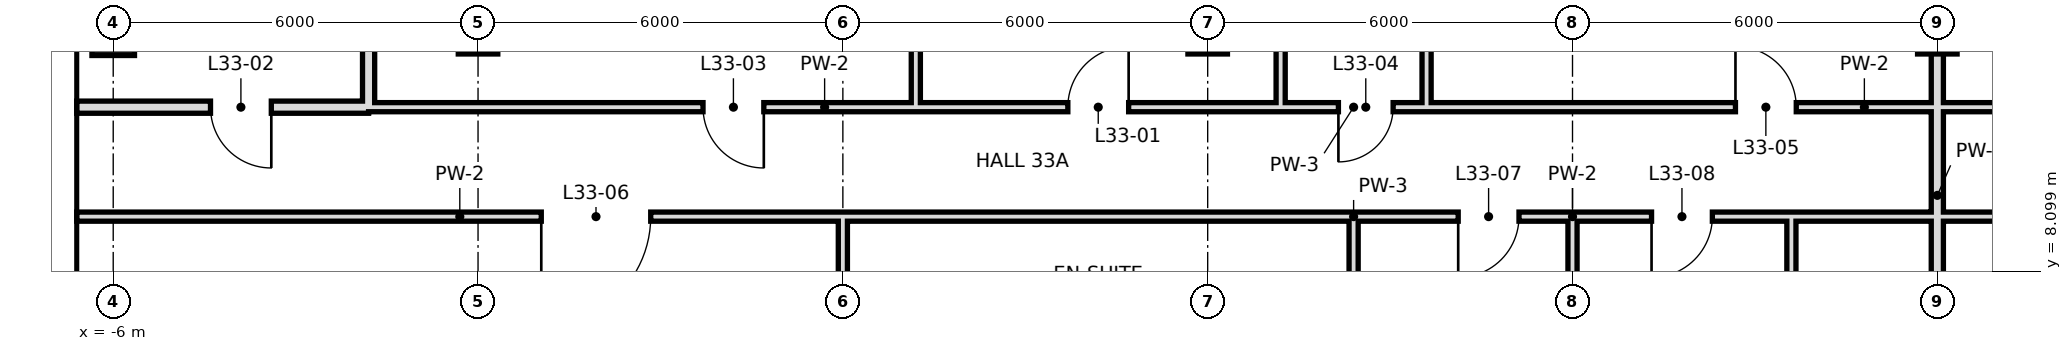
"""IFC4 building model, lengths in metres.
Left out: names, types, materials, properties, quantities, classifications, styles, units other than length and angle.
Written with IfcOpenShell. Run it as: python <this file> out.ifc"""

import sys

from ifc_helpers import new_model, si_unit, direction, frame, frame_2d, origin, origin_2d, place, context, subcontext, project, spatial, rectangle, hollow_rectangle, extrude, element, fill, save


model = new_model("IFC4")
c1 = context("Model", 3, precision=1e-05, world=origin(), true_north=direction((0.0, 1.0)))
c2 = subcontext(c1, "Body", "Model", "MODEL_VIEW")
j1 = project(units=[si_unit("LENGTHUNIT", "METRE"), si_unit("PLANEANGLEUNIT", "RADIAN")], contexts=[c1])
p1 = place(None, origin())
s1 = spatial("IfcSite", under=j1, at=p1, CompositionType="ELEMENT")
p2 = place(p1, origin())
s2 = spatial("IfcBuilding", under=s1, at=p2, CompositionType="ELEMENT")
p3 = place(p2, frame((0.0, 0.0, 147.4)))
s3 = spatial("IfcBuildingStorey", under=s2, at=p3, CompositionType="ELEMENT", Elevation=147.4)
p4 = place(p3, frame((-6.0, 12.0, 0.0), z_axis=(0.0, 0.0, 1.0), x_axis=(1.0, 0.0, 0.0)))
e1 = element("IfcColumn", 1, at=p4, inside=s3, PredefinedType="COLUMN", context=c2, shape_type="SweptSolid", body=[
    extrude(hollow_rectangle(XDim=0.7, YDim=0.7, WallThickness=0.036, at=origin_2d()), origin(), (0.0, 0.0, 1.0), 3.6),
])
for number, where, z_axis, x_axis in (
    (2, (0.0, 12.0, 0.0), (0.0, 0.0, 1.0), (1.0, 0.0, 0.0)),
    (3, (12.0, 12.0, 0.0), (0.0, 0.0, 1.0), (1.0, 0.0, 0.0)),
    (4, (24.0, 12.0, 0.0), (0.0, 0.0, 1.0), (1.0, 0.0, 0.0)),
):
    element("IfcColumn", number, at=place(p3, frame(where, z_axis=z_axis, x_axis=x_axis)), inside=s3, PredefinedType="COLUMN", context=c2, shape_type="SweptSolid", body=[
        extrude(hollow_rectangle(XDim=0.65, YDim=0.65, WallThickness=0.032, at=origin_2d()), origin(), (0.0, 0.0, 1.0), 3.6),
    ])
p5 = place(p3, frame((-1.8, 10.8, 0.0), z_axis=(0.0, 0.0, 1.0), x_axis=(0.0, 1.0, 0.0)))
e5 = element("IfcWall", 5, at=p5, inside=s3, PredefinedType="SOLIDWALL", context=c2, shape_type="SweptSolid", body=[
    extrude(rectangle(XDim=7.2, YDim=0.2, at=frame_2d((3.6, 0.0))), origin(), (0.0, 0.0, 1.0), 3.42),
])
p6 = place(p3, frame((13.2, 10.8, 0.0), z_axis=(0.0, 0.0, 1.0), x_axis=(0.0, 1.0, 0.0)))
e6 = element("IfcWall", 6, at=p6, inside=s3, PredefinedType="PARTITIONING", context=c2, shape_type="SweptSolid", body=[
    extrude(rectangle(XDim=7.9, YDim=0.15, at=frame_2d((3.95, 0.0))), origin(), (0.0, 0.0, 1.0), 3.42),
])
p7 = place(p3, frame((14.4, 6.0, 0.0), z_axis=(0.0, 0.0, 1.0), x_axis=(0.0, 1.0, 0.0)))
e7 = element("IfcWall", 7, at=p7, inside=s3, PredefinedType="PARTITIONING", context=c2, shape_type="SweptSolid", body=[
    extrude(rectangle(XDim=3.0, YDim=0.15, at=frame_2d((1.5, 0.0))), origin(), (0.0, 0.0, 1.0), 3.42),
])
p8 = place(p3, frame((15.6, 10.8, 0.0), z_axis=(0.0, 0.0, 1.0), x_axis=(0.0, 1.0, 0.0)))
e8 = element("IfcWall", 8, at=p8, inside=s3, PredefinedType="PARTITIONING", context=c2, shape_type="SweptSolid", body=[
    extrude(rectangle(XDim=7.9, YDim=0.15, at=frame_2d((3.95, 0.0))), origin(), (0.0, 0.0, 1.0), 3.42),
])
p9 = place(p3, frame((18.0, -0.6, 0.0), z_axis=(0.0, 0.0, 1.0), x_axis=(0.0, 1.0, 0.0)))
e9 = element("IfcWall", 9, at=p9, inside=s3, PredefinedType="PARTITIONING", context=c2, shape_type="SweptSolid", body=[
    extrude(rectangle(XDim=9.6, YDim=0.15, at=frame_2d((4.8, 0.0))), origin(), (0.0, 0.0, 1.0), 2.72),
])
p10 = place(p3, frame((21.6, 6.0, 0.0), z_axis=(0.0, 0.0, 1.0), x_axis=(0.0, 1.0, 0.0)))
e10 = element("IfcWall", 10, at=p10, inside=s3, PredefinedType="PARTITIONING", context=c2, shape_type="SweptSolid", body=[
    extrude(rectangle(XDim=3.0, YDim=0.15, at=frame_2d((1.5, 0.0))), origin(), (0.0, 0.0, 1.0), 3.42),
])
p11 = place(p3, frame((24.0, 0.0, 0.0), z_axis=(0.0, 0.0, 1.0), x_axis=(0.0, 1.0, 0.0)))
e11 = element("IfcWall", 11, at=p11, inside=s3, PredefinedType="SOLIDWALL", context=c2, shape_type="SweptSolid", body=[
    extrude(rectangle(XDim=18.7, YDim=0.2, at=frame_2d((9.35, 0.0))), origin(), (0.0, 0.0, 1.0), 2.72),
])
p12 = place(p3, frame((6.0, 6.0, 0.0), z_axis=(0.0, 0.0, 1.0), x_axis=(0.0, 1.0, 0.0)))
e12 = element("IfcWall", 12, at=p12, inside=s3, PredefinedType="PARTITIONING", context=c2, shape_type="SweptSolid", body=[
    extrude(rectangle(XDim=3.0, YDim=0.15, at=frame_2d((1.5, 0.0))), origin(), (0.0, 0.0, 1.0), 2.72),
])
p13 = place(p3, frame((7.2, 10.8, 0.0), z_axis=(0.0, 0.0, 1.0), x_axis=(0.0, 1.0, 0.0)))
e13 = element("IfcWall", 13, at=p13, inside=s3, PredefinedType="PARTITIONING", context=c2, shape_type="SweptSolid", body=[
    extrude(rectangle(XDim=7.9, YDim=0.15, at=frame_2d((3.95, 0.0))), origin(), (0.0, 0.0, 1.0), 3.42),
])
p14 = place(p3, frame((-6.6, 10.8, 0.0), z_axis=(0.0, 0.0, 1.0), x_axis=(1.0, 0.0, 0.0)))
e14 = element("IfcWall", 14, at=p14, inside=s3, PredefinedType="SOLIDWALL", context=c2, shape_type="SweptSolid", body=[
    extrude(rectangle(XDim=4.8, YDim=0.2, at=frame_2d((2.4, 0.0))), origin(), (0.0, 0.0, 1.0), 2.97),
])
p15 = place(p14, frame((2.2, 0.0, 0.0)))
e15 = element("IfcOpeningElement", 15, at=p15, cuts=e14, PredefinedType="OPENING", context=c2, shape_type="SweptSolid", body=[
    extrude(rectangle(XDim=1.0, YDim=2.4, at=frame_2d((0.5, 1.2))), frame((0.0, 0.11, 0.0), z_axis=(0.0, -1.0, 0.0), x_axis=(1.0, 0.0, 0.0)), (0.0, 0.0, 1.0), 0.22),
])
p16 = place(p3, frame((-1.8, 10.8, 0.0), z_axis=(0.0, 0.0, 1.0), x_axis=(1.0, 0.0, 0.0)))
e16 = element("IfcWall", 16, at=p16, inside=s3, PredefinedType="PARTITIONING", context=c2, shape_type="SweptSolid", body=[
    extrude(rectangle(XDim=15.0, YDim=0.15, at=frame_2d((7.5, 0.0))), origin(), (0.0, 0.0, 1.0), 3.42),
])
p17 = place(p16, frame((11.5, 0.0, 0.0)))
e17 = element("IfcOpeningElement", 17, at=p17, cuts=e16, PredefinedType="OPENING", context=c2, shape_type="SweptSolid", body=[
    extrude(rectangle(XDim=1.0, YDim=2.4, at=frame_2d((0.5, 1.2))), frame((0.0, 0.085, 0.0), z_axis=(0.0, -1.0, 0.0), x_axis=(1.0, 0.0, 0.0)), (0.0, 0.0, 1.0), 0.17),
])
p18 = place(p16, frame((5.5, 0.0, 0.0)))
e18 = element("IfcOpeningElement", 18, at=p18, cuts=e16, PredefinedType="OPENING", context=c2, shape_type="SweptSolid", body=[
    extrude(rectangle(XDim=1.0, YDim=2.4, at=frame_2d((0.5, 1.2))), frame((0.0, 0.085, 0.0), z_axis=(0.0, -1.0, 0.0), x_axis=(1.0, 0.0, 0.0)), (0.0, 0.0, 1.0), 0.17),
])
p19 = place(p3, frame((15.6, 10.8, 0.0), z_axis=(0.0, 0.0, 1.0), x_axis=(1.0, 0.0, 0.0)))
e19 = element("IfcWall", 19, at=p19, inside=s3, PredefinedType="PARTITIONING", context=c2, shape_type="SweptSolid", body=[
    extrude(rectangle(XDim=14.4, YDim=0.15, at=frame_2d((7.2, 0.0))), origin(), (0.0, 0.0, 1.0), 3.42),
])
p20 = place(p19, frame((5.08, 0.0, 0.0)))
e20 = element("IfcOpeningElement", 20, at=p20, cuts=e19, PredefinedType="OPENING", context=c2, shape_type="SweptSolid", body=[
    extrude(rectangle(XDim=1.0, YDim=2.4, at=frame_2d((0.5, 1.2))), frame((0.0, 0.085, 0.0), z_axis=(0.0, -1.0, 0.0), x_axis=(1.0, 0.0, 0.0)), (0.0, 0.0, 1.0), 0.17),
])
p21 = place(p19, frame((10.9, 0.0, 0.0)))
e21 = element("IfcOpeningElement", 21, at=p21, cuts=e19, PredefinedType="OPENING", context=c2, shape_type="SweptSolid", body=[
    extrude(rectangle(XDim=1.0, YDim=2.4, at=frame_2d((0.5, 1.2))), frame((0.0, 0.085, 0.0), z_axis=(0.0, -1.0, 0.0), x_axis=(1.0, 0.0, 0.0)), (0.0, 0.0, 1.0), 0.17),
])
p22 = place(p3, frame((13.2, 10.8, 0.0), z_axis=(0.0, 0.0, 1.0), x_axis=(1.0, 0.0, 0.0)))
e22 = element("IfcWall", 22, at=p22, inside=s3, PredefinedType="PARTITIONING", context=c2, shape_type="SweptSolid", body=[
    extrude(rectangle(XDim=2.4, YDim=0.15, at=frame_2d((1.2, 0.0))), origin(), (0.0, 0.0, 1.0), 3.42),
])
p23 = place(p22, frame((0.95, 0.0, 0.0)))
e23 = element("IfcOpeningElement", 23, at=p23, cuts=e22, PredefinedType="OPENING", context=c2, shape_type="SweptSolid", body=[
    extrude(rectangle(XDim=0.9, YDim=2.4, at=frame_2d((0.45, 1.2))), frame((0.0, 0.085, 0.0), z_axis=(0.0, -1.0, 0.0), x_axis=(1.0, 0.0, 0.0)), (0.0, 0.0, 1.0), 0.17),
])
p24 = place(p3, frame((-6.6, 9.0, 0.0), z_axis=(0.0, 0.0, 1.0), x_axis=(1.0, 0.0, 0.0)))
e24 = element("IfcWall", 24, at=p24, inside=s3, PredefinedType="PARTITIONING", context=c2, shape_type="SweptSolid", body=[
    extrude(rectangle(XDim=12.6, YDim=0.15, at=frame_2d((6.3, 0.0))), origin(), (0.0, 0.0, 1.0), 3.42),
])
p25 = place(p24, frame((7.64, 0.0, 0.0)))
e25 = element("IfcOpeningElement", 25, at=p25, cuts=e24, PredefinedType="OPENING", context=c2, shape_type="SweptSolid", body=[
    extrude(rectangle(XDim=1.8, YDim=2.4, at=frame_2d((0.9, 1.2))), frame((0.0, 0.085, 0.0), z_axis=(0.0, -1.0, 0.0), x_axis=(1.0, 0.0, 0.0)), (0.0, 0.0, 1.0), 0.17),
])
p26 = place(p3, frame((14.4, 9.0, 0.0), z_axis=(0.0, 0.0, 1.0), x_axis=(1.0, 0.0, 0.0)))
e26 = element("IfcWall", 26, at=p26, inside=s3, PredefinedType="PARTITIONING", context=c2, shape_type="SweptSolid", body=[
    extrude(rectangle(XDim=7.2, YDim=0.15, at=frame_2d((3.6, 0.0))), origin(), (0.0, 0.0, 1.0), 3.42),
])
p27 = place(p26, frame((1.72, 0.0, 0.0)))
e27 = element("IfcOpeningElement", 27, at=p27, cuts=e26, PredefinedType="OPENING", context=c2, shape_type="SweptSolid", body=[
    extrude(rectangle(XDim=1.0, YDim=2.4, at=frame_2d((0.5, 1.2))), frame((0.0, 0.085, 0.0), z_axis=(0.0, -1.0, 0.0), x_axis=(1.0, 0.0, 0.0)), (0.0, 0.0, 1.0), 0.17),
])
p28 = place(p26, frame((4.9, 0.0, 0.0)))
e28 = element("IfcOpeningElement", 28, at=p28, cuts=e26, PredefinedType="OPENING", context=c2, shape_type="SweptSolid", body=[
    extrude(rectangle(XDim=1.0, YDim=2.4, at=frame_2d((0.5, 1.2))), frame((0.0, 0.085, 0.0), z_axis=(0.0, -1.0, 0.0), x_axis=(1.0, 0.0, 0.0)), (0.0, 0.0, 1.0), 0.17),
])
p29 = place(p3, frame((24.0, 9.0, 0.0), z_axis=(0.0, 0.0, 1.0), x_axis=(1.0, 0.0, 0.0)))
e29 = element("IfcWall", 29, at=p29, inside=s3, PredefinedType="PARTITIONING", context=c2, shape_type="SweptSolid", body=[
    extrude(rectangle(XDim=27.6, YDim=0.15, at=frame_2d((13.8, 0.0))), origin(), (0.0, 0.0, 1.0), 3.42),
])
p30 = place(p29, frame((3.16, 0.0, 0.0)))
e30 = element("IfcOpeningElement", 30, at=p30, cuts=e29, PredefinedType="OPENING", context=c2, shape_type="SweptSolid", body=[
    extrude(rectangle(XDim=1.8, YDim=2.4, at=frame_2d((0.9, 1.2))), frame((0.0, 0.085, 0.0), z_axis=(0.0, -1.0, 0.0), x_axis=(1.0, 0.0, 0.0)), (0.0, 0.0, 1.0), 0.17),
])
p31 = place(p29, frame((13.6, 0.0, 0.0)))
e31 = element("IfcOpeningElement", 31, at=p31, cuts=e29, PredefinedType="OPENING", context=c2, shape_type="SweptSolid", body=[
    extrude(rectangle(XDim=1.0, YDim=2.4, at=frame_2d((0.5, 1.2))), frame((0.0, 0.085, 0.0), z_axis=(0.0, -1.0, 0.0), x_axis=(1.0, 0.0, 0.0)), (0.0, 0.0, 1.0), 0.17),
])
p32 = place(p29, frame((21.4, 0.0, 0.0)))
e32 = element("IfcOpeningElement", 32, at=p32, cuts=e29, PredefinedType="OPENING", context=c2, shape_type="SweptSolid", body=[
    extrude(rectangle(XDim=1.0, YDim=2.4, at=frame_2d((0.5, 1.2))), frame((0.0, 0.085, 0.0), z_axis=(0.0, -1.0, 0.0), x_axis=(1.0, 0.0, 0.0)), (0.0, 0.0, 1.0), 0.17),
])
p33 = place(p29, frame((24.88, 0.0, 0.0)))
e33 = element("IfcOpeningElement", 33, at=p33, cuts=e29, PredefinedType="OPENING", context=c2, shape_type="SweptSolid", body=[
    extrude(rectangle(XDim=1.0, YDim=2.4, at=frame_2d((0.5, 1.2))), frame((0.0, 0.085, 0.0), z_axis=(0.0, -1.0, 0.0), x_axis=(1.0, 0.0, 0.0)), (0.0, 0.0, 1.0), 0.17),
])
p34 = place(p3, frame((6.0, 9.0, 0.0), z_axis=(0.0, 0.0, 1.0), x_axis=(1.0, 0.0, 0.0)))
e34 = element("IfcWall", 34, at=p34, inside=s3, PredefinedType="PARTITIONING", context=c2, shape_type="SweptSolid", body=[
    extrude(rectangle(XDim=8.4, YDim=0.15, at=frame_2d((4.2, 0.0))), origin(), (0.0, 0.0, 1.0), 3.42),
])
p35 = place(p3, frame((21.6, 9.0, 0.0), z_axis=(0.0, 0.0, 1.0), x_axis=(1.0, 0.0, 0.0)))
e35 = element("IfcWall", 35, at=p35, inside=s3, PredefinedType="PARTITIONING", context=c2, shape_type="SweptSolid", body=[
    extrude(rectangle(XDim=2.4, YDim=0.15, at=frame_2d((1.2, 0.0))), origin(), (0.0, 0.0, 1.0), 3.42),
])
p36 = place(p17, frame((1.0, 0.0, 0.0), z_axis=(0.0, 0.0, 1.0), x_axis=(-1.0, 0.0, 0.0)))
e36 = element("IfcDoor", 36, at=p36, inside=s3, OperationType="SINGLE_SWING_LEFT", PredefinedType="DOOR", context=c2, shape_type="SweptSolid", body=[
    extrude(rectangle(XDim=1.0, YDim=2.4, at=frame_2d((0.5, 1.2))), frame((0.0, 0.025, 0.0), z_axis=(0.0, -1.0, 0.0), x_axis=(1.0, 0.0, 0.0)), (0.0, 0.0, 1.0), 0.05),
])
fill(e17, e36)
p37 = place(p15, origin())
e37 = element("IfcDoor", 37, at=p37, inside=s3, OperationType="SINGLE_SWING_RIGHT", PredefinedType="DOOR", context=c2, shape_type="SweptSolid", body=[
    extrude(rectangle(XDim=1.0, YDim=2.4, at=frame_2d((0.5, 1.2))), frame((0.0, 0.025, 0.0), z_axis=(0.0, -1.0, 0.0), x_axis=(1.0, 0.0, 0.0)), (0.0, 0.0, 1.0), 0.05),
])
fill(e15, e37)
p38 = place(p18, origin())
e38 = element("IfcDoor", 38, at=p38, inside=s3, OperationType="SINGLE_SWING_RIGHT", PredefinedType="DOOR", context=c2, shape_type="SweptSolid", body=[
    extrude(rectangle(XDim=1.0, YDim=2.4, at=frame_2d((0.5, 1.2))), frame((0.0, 0.025, 0.0), z_axis=(0.0, -1.0, 0.0), x_axis=(1.0, 0.0, 0.0)), (0.0, 0.0, 1.0), 0.05),
])
fill(e18, e38)
p39 = place(p23, frame((0.9, 0.0, 0.0), z_axis=(0.0, 0.0, 1.0), x_axis=(-1.0, 0.0, 0.0)))
e39 = element("IfcDoor", 39, at=p39, inside=s3, OperationType="SINGLE_SWING_RIGHT", PredefinedType="DOOR", context=c2, shape_type="SweptSolid", body=[
    extrude(rectangle(XDim=0.9, YDim=2.4, at=frame_2d((0.45, 1.2))), frame((0.0, 0.025, 0.0), z_axis=(0.0, -1.0, 0.0), x_axis=(1.0, 0.0, 0.0)), (0.0, 0.0, 1.0), 0.05),
])
fill(e23, e39)
p40 = place(p20, origin())
e40 = element("IfcDoor", 40, at=p40, inside=s3, OperationType="SINGLE_SWING_LEFT", PredefinedType="DOOR", context=c2, shape_type="SweptSolid", body=[
    extrude(rectangle(XDim=1.0, YDim=2.4, at=frame_2d((0.5, 1.2))), frame((0.0, 0.025, 0.0), z_axis=(0.0, -1.0, 0.0), x_axis=(1.0, 0.0, 0.0)), (0.0, 0.0, 1.0), 0.05),
])
fill(e20, e40)
p41 = place(p25, frame((1.8, 0.0, 0.0), z_axis=(0.0, 0.0, 1.0), x_axis=(-1.0, 0.0, 0.0)))
e41 = element("IfcDoor", 41, at=p41, inside=s3, OperationType="SINGLE_SWING_RIGHT", PredefinedType="DOOR", context=c2, shape_type="SweptSolid", body=[
    extrude(rectangle(XDim=1.8, YDim=2.4, at=frame_2d((0.9, 1.2))), frame((0.0, 0.025, 0.0), z_axis=(0.0, -1.0, 0.0), x_axis=(1.0, 0.0, 0.0)), (0.0, 0.0, 1.0), 0.05),
])
fill(e25, e41)
p42 = place(p27, frame((1.0, 0.0, 0.0), z_axis=(0.0, 0.0, 1.0), x_axis=(-1.0, 0.0, 0.0)))
e42 = element("IfcDoor", 42, at=p42, inside=s3, OperationType="SINGLE_SWING_RIGHT", PredefinedType="DOOR", context=c2, shape_type="SweptSolid", body=[
    extrude(rectangle(XDim=1.0, YDim=2.4, at=frame_2d((0.5, 1.2))), frame((0.0, 0.025, 0.0), z_axis=(0.0, -1.0, 0.0), x_axis=(1.0, 0.0, 0.0)), (0.0, 0.0, 1.0), 0.05),
])
fill(e27, e42)
p43 = place(p28, frame((1.0, 0.0, 0.0), z_axis=(0.0, 0.0, 1.0), x_axis=(-1.0, 0.0, 0.0)))
e43 = element("IfcDoor", 43, at=p43, inside=s3, OperationType="SINGLE_SWING_RIGHT", PredefinedType="DOOR", context=c2, shape_type="SweptSolid", body=[
    extrude(rectangle(XDim=1.0, YDim=2.4, at=frame_2d((0.5, 1.2))), frame((0.0, 0.025, 0.0), z_axis=(0.0, -1.0, 0.0), x_axis=(1.0, 0.0, 0.0)), (0.0, 0.0, 1.0), 0.05),
])
fill(e28, e43)
save(model, sys.argv[1])
